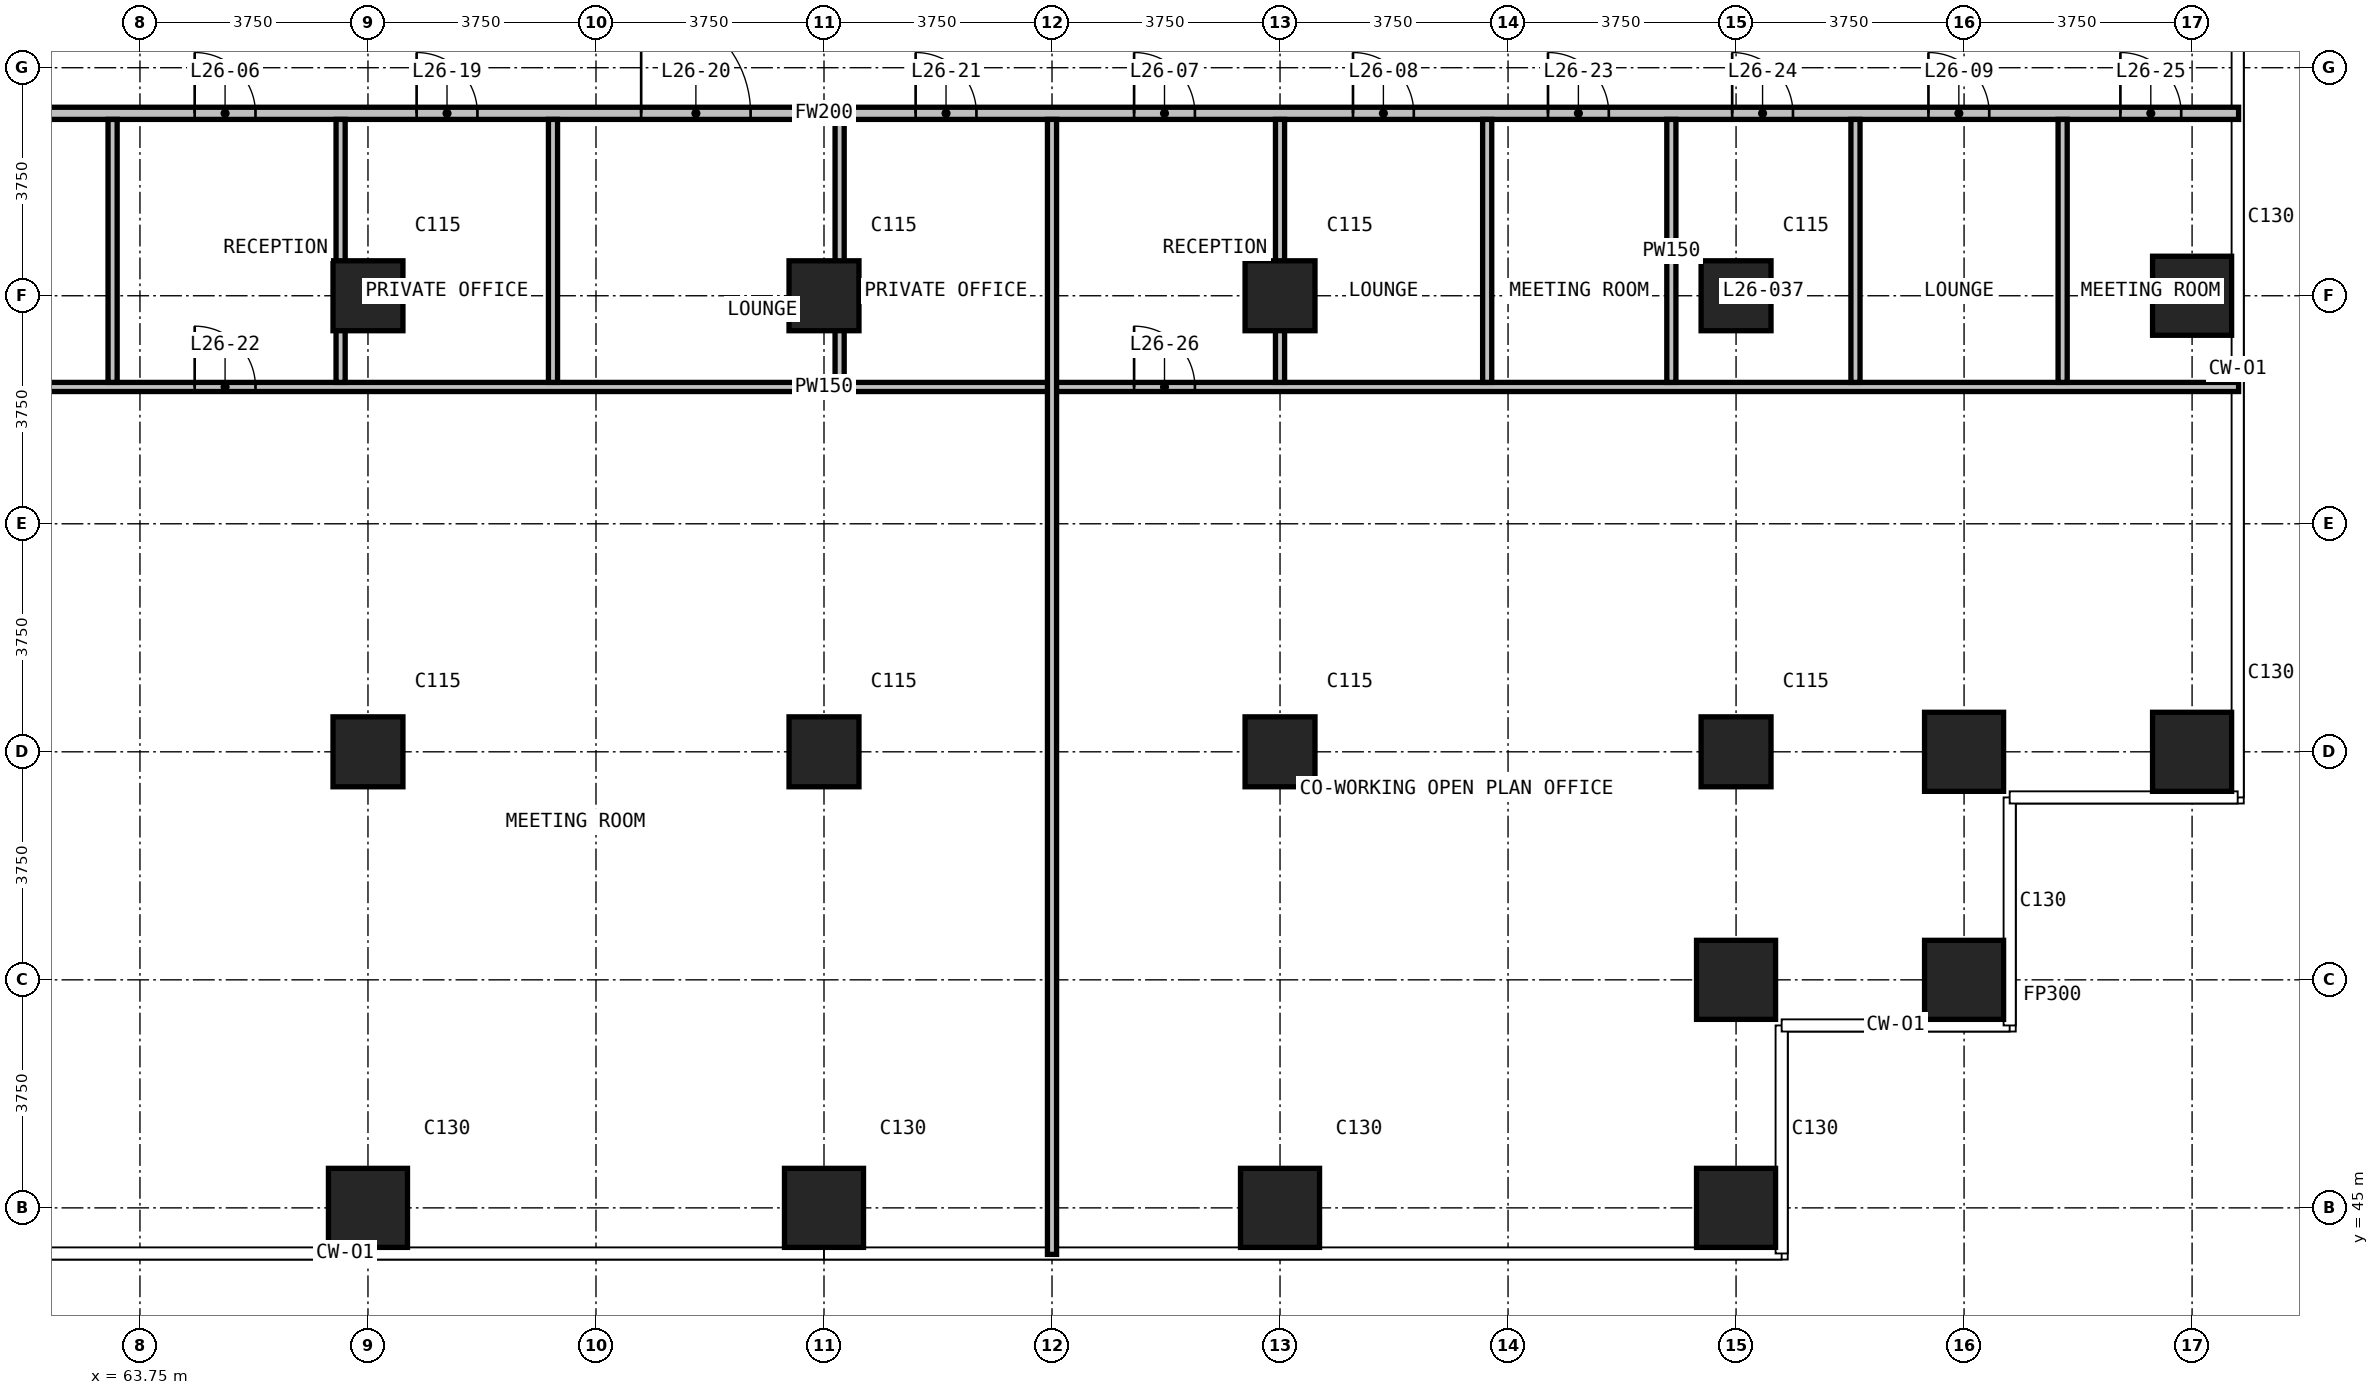
"""IFC4 building model, lengths in metres.
Left out: names, types, materials, properties, quantities, classifications, styles, units other than length and angle.
Written with IfcOpenShell. Run it as: python <this file> out.ifc"""

import sys

from ifc_helpers import new_model, si_unit, direction, frame, frame_2d, origin, origin_2d, place, context, subcontext, project, spatial, rectangle, extrude, element, fill, save


model = new_model("IFC4")
c1 = context("Model", 3, precision=1e-05, world=origin(), true_north=direction((0.0, 1.0)))
c2 = subcontext(c1, "Body", "Model", "MODEL_VIEW")
j1 = project(units=[si_unit("LENGTHUNIT", "METRE"), si_unit("PLANEANGLEUNIT", "RADIAN")], contexts=[c1])
p1 = place(None, origin())
s1 = spatial("IfcSite", under=j1, at=p1, CompositionType="ELEMENT")
p2 = place(p1, origin())
s2 = spatial("IfcBuilding", under=s1, at=p2, CompositionType="ELEMENT")
p3 = place(p2, frame((0.0, 0.0, 107.2)))
s3 = spatial("IfcBuildingStorey", under=s2, at=p3, CompositionType="ELEMENT", Elevation=107.2)
p4 = place(p3, frame((67.5, 45.0, 0.0), z_axis=(0.0, 0.0, 1.0), x_axis=(1.0, 0.0, 0.0)))
e1 = element("IfcColumn", 1, at=p4, inside=s3, PredefinedType="COLUMN", context=c2, shape_type="SweptSolid", body=[
    extrude(rectangle(XDim=1.3, YDim=1.3, at=origin_2d()), origin(), (0.0, 0.0, 1.0), 3.6),
])
for number, where, z_axis, x_axis in (
    (2, (67.5, 52.5, 0.0), (0.0, 0.0, 1.0), (1.0, 0.0, 0.0)),
    (3, (67.5, 60.0, 0.0), (0.0, 0.0, 1.0), (1.0, 0.0, 0.0)),
):
    element("IfcColumn", number, at=place(p3, frame(where, z_axis=z_axis, x_axis=x_axis)), inside=s3, PredefinedType="COLUMN", context=c2, shape_type="SweptSolid", body=[
        extrude(rectangle(XDim=1.15, YDim=1.15, at=origin_2d()), origin(), (0.0, 0.0, 1.0), 3.6),
    ])
p5 = place(p3, frame((75.0, 45.0, 0.0), z_axis=(0.0, 0.0, 1.0), x_axis=(1.0, 0.0, 0.0)))
e4 = element("IfcColumn", 4, at=p5, inside=s3, PredefinedType="COLUMN", context=c2, shape_type="SweptSolid", body=[
    extrude(rectangle(XDim=1.3, YDim=1.3, at=origin_2d()), origin(), (0.0, 0.0, 1.0), 3.6),
])
for number, where, z_axis, x_axis in (
    (5, (75.0, 52.5, 0.0), (0.0, 0.0, 1.0), (1.0, 0.0, 0.0)),
    (6, (75.0, 60.0, 0.0), (0.0, 0.0, 1.0), (1.0, 0.0, 0.0)),
):
    element("IfcColumn", number, at=place(p3, frame(where, z_axis=z_axis, x_axis=x_axis)), inside=s3, PredefinedType="COLUMN", context=c2, shape_type="SweptSolid", body=[
        extrude(rectangle(XDim=1.15, YDim=1.15, at=origin_2d()), origin(), (0.0, 0.0, 1.0), 3.6),
    ])
p6 = place(p3, frame((82.5, 45.0, 0.0), z_axis=(0.0, 0.0, 1.0), x_axis=(1.0, 0.0, 0.0)))
e7 = element("IfcColumn", 7, at=p6, inside=s3, PredefinedType="COLUMN", context=c2, shape_type="SweptSolid", body=[
    extrude(rectangle(XDim=1.3, YDim=1.3, at=origin_2d()), origin(), (0.0, 0.0, 1.0), 3.6),
])
for number, where, z_axis, x_axis in (
    (8, (82.5, 52.5, 0.0), (0.0, 0.0, 1.0), (1.0, 0.0, 0.0)),
    (9, (82.5, 60.0, 0.0), (0.0, 0.0, 1.0), (1.0, 0.0, 0.0)),
):
    element("IfcColumn", number, at=place(p3, frame(where, z_axis=z_axis, x_axis=x_axis)), inside=s3, PredefinedType="COLUMN", context=c2, shape_type="SweptSolid", body=[
        extrude(rectangle(XDim=1.15, YDim=1.15, at=origin_2d()), origin(), (0.0, 0.0, 1.0), 3.6),
    ])
for number, where, z_axis, x_axis in (
    (10, (90.0, 45.0, 0.0), (0.0, 0.0, 1.0), (1.0, 0.0, 0.0)),
    (11, (90.0, 48.75, 0.0), (0.0, 0.0, 1.0), (1.0, 0.0, 0.0)),
):
    element("IfcColumn", number, at=place(p3, frame(where, z_axis=z_axis, x_axis=x_axis)), inside=s3, PredefinedType="COLUMN", context=c2, shape_type="SweptSolid", body=[
        extrude(rectangle(XDim=1.3, YDim=1.3, at=origin_2d()), origin(), (0.0, 0.0, 1.0), 3.6),
    ])
for number, where, z_axis, x_axis in (
    (12, (90.0, 52.5, 0.0), (0.0, 0.0, 1.0), (1.0, 0.0, 0.0)),
    (13, (90.0, 60.0, 0.0), (0.0, 0.0, 1.0), (1.0, 0.0, 0.0)),
):
    element("IfcColumn", number, at=place(p3, frame(where, z_axis=z_axis, x_axis=x_axis)), inside=s3, PredefinedType="COLUMN", context=c2, shape_type="SweptSolid", body=[
        extrude(rectangle(XDim=1.15, YDim=1.15, at=origin_2d()), origin(), (0.0, 0.0, 1.0), 3.6),
    ])
for number, where, z_axis, x_axis in (
    (14, (93.75, 48.75, 0.0), (0.0, 0.0, 1.0), (1.0, 0.0, 0.0)),
    (15, (93.75, 52.5, 0.0), (0.0, 0.0, 1.0), (1.0, 0.0, 0.0)),
    (16, (97.5, 52.5, 0.0), (0.0, 0.0, 1.0), (1.0, 0.0, 0.0)),
    (17, (97.5, 60.0, 0.0), (0.0, 0.0, 1.0), (1.0, 0.0, 0.0)),
):
    element("IfcColumn", number, at=place(p3, frame(where, z_axis=z_axis, x_axis=x_axis)), inside=s3, PredefinedType="COLUMN", context=c2, shape_type="SweptSolid", body=[
        extrude(rectangle(XDim=1.3, YDim=1.3, at=origin_2d()), origin(), (0.0, 0.0, 1.0), 3.6),
    ])
p7 = place(p3, frame((51.735, 63.0, 0.0), z_axis=(0.0, 0.0, 1.0), x_axis=(1.0, 0.0, 0.0)))
e18 = element("IfcWall", 18, at=p7, inside=s3, PredefinedType="PARTITIONING", context=c2, shape_type="SweptSolid", body=[
    extrude(rectangle(XDim=46.53, YDim=0.2, at=frame_2d((23.265, 0.0))), origin(), (0.0, 0.0, 1.0), 3.3),
])
p8 = place(p7, frame((12.915, 0.0, 0.0)))
e19 = element("IfcOpeningElement", 19, at=p8, cuts=e18, PredefinedType="OPENING", context=c2, shape_type="SweptSolid", body=[
    extrude(rectangle(XDim=1.0, YDim=2.2, at=frame_2d((0.5, 1.1))), frame((0.0, 0.11, 0.0), z_axis=(0.0, -1.0, 0.0), x_axis=(1.0, 0.0, 0.0)), (0.0, 0.0, 1.0), 0.22),
])
p9 = place(p7, frame((28.365, 0.0, 0.0)))
e20 = element("IfcOpeningElement", 20, at=p9, cuts=e18, PredefinedType="OPENING", context=c2, shape_type="SweptSolid", body=[
    extrude(rectangle(XDim=1.0, YDim=2.2, at=frame_2d((0.5, 1.1))), frame((0.0, 0.11, 0.0), z_axis=(0.0, -1.0, 0.0), x_axis=(1.0, 0.0, 0.0)), (0.0, 0.0, 1.0), 0.22),
])
p10 = place(p7, frame((31.965, 0.0, 0.0)))
e21 = element("IfcOpeningElement", 21, at=p10, cuts=e18, PredefinedType="OPENING", context=c2, shape_type="SweptSolid", body=[
    extrude(rectangle(XDim=1.0, YDim=2.2, at=frame_2d((0.5, 1.1))), frame((0.0, 0.11, 0.0), z_axis=(0.0, -1.0, 0.0), x_axis=(1.0, 0.0, 0.0)), (0.0, 0.0, 1.0), 0.22),
])
p11 = place(p7, frame((41.429, 0.0, 0.0)))
e22 = element("IfcOpeningElement", 22, at=p11, cuts=e18, PredefinedType="OPENING", context=c2, shape_type="SweptSolid", body=[
    extrude(rectangle(XDim=1.0, YDim=2.2, at=frame_2d((0.5, 1.1))), frame((0.0, 0.11, 0.0), z_axis=(0.0, -1.0, 0.0), x_axis=(1.0, 0.0, 0.0)), (0.0, 0.0, 1.0), 0.22),
])
p12 = place(p7, frame((1.15, 0.0, 0.0)))
e23 = element("IfcOpeningElement", 23, at=p12, cuts=e18, PredefinedType="OPENING", context=c2, shape_type="SweptSolid", body=[
    extrude(rectangle(XDim=1.8, YDim=2.2, at=frame_2d((0.9, 1.1))), frame((0.0, 0.11, 0.0), z_axis=(0.0, -1.0, 0.0), x_axis=(1.0, 0.0, 0.0)), (0.0, 0.0, 1.0), 0.22),
])
p13 = place(p7, frame((5.234, 0.0, 0.0)))
e24 = element("IfcOpeningElement", 24, at=p13, cuts=e18, PredefinedType="OPENING", context=c2, shape_type="SweptSolid", body=[
    extrude(rectangle(XDim=1.0, YDim=2.2, at=frame_2d((0.5, 1.1))), frame((0.0, 0.11, 0.0), z_axis=(0.0, -1.0, 0.0), x_axis=(1.0, 0.0, 0.0)), (0.0, 0.0, 1.0), 0.22),
])
p14 = place(p7, frame((8.546, 0.0, 0.0)))
e25 = element("IfcOpeningElement", 25, at=p14, cuts=e18, PredefinedType="OPENING", context=c2, shape_type="SweptSolid", body=[
    extrude(rectangle(XDim=1.8, YDim=2.2, at=frame_2d((0.9, 1.1))), frame((0.0, 0.11, 0.0), z_axis=(0.0, -1.0, 0.0), x_axis=(1.0, 0.0, 0.0)), (0.0, 0.0, 1.0), 0.22),
])
p15 = place(p7, frame((16.565, 0.0, 0.0)))
e26 = element("IfcOpeningElement", 26, at=p15, cuts=e18, PredefinedType="OPENING", context=c2, shape_type="SweptSolid", body=[
    extrude(rectangle(XDim=1.0, YDim=2.2, at=frame_2d((0.5, 1.1))), frame((0.0, 0.11, 0.0), z_axis=(0.0, -1.0, 0.0), x_axis=(1.0, 0.0, 0.0)), (0.0, 0.0, 1.0), 0.22),
])
p16 = place(p7, frame((20.258, 0.0, 0.0)))
e27 = element("IfcOpeningElement", 27, at=p16, cuts=e18, PredefinedType="OPENING", context=c2, shape_type="SweptSolid", body=[
    extrude(rectangle(XDim=1.8, YDim=2.2, at=frame_2d((0.9, 1.1))), frame((0.0, 0.11, 0.0), z_axis=(0.0, -1.0, 0.0), x_axis=(1.0, 0.0, 0.0)), (0.0, 0.0, 1.0), 0.22),
])
p17 = place(p7, frame((24.772, 0.0, 0.0)))
e28 = element("IfcOpeningElement", 28, at=p17, cuts=e18, PredefinedType="OPENING", context=c2, shape_type="SweptSolid", body=[
    extrude(rectangle(XDim=1.0, YDim=2.2, at=frame_2d((0.5, 1.1))), frame((0.0, 0.11, 0.0), z_axis=(0.0, -1.0, 0.0), x_axis=(1.0, 0.0, 0.0)), (0.0, 0.0, 1.0), 0.22),
])
p18 = place(p7, frame((35.172, 0.0, 0.0)))
e29 = element("IfcOpeningElement", 29, at=p18, cuts=e18, PredefinedType="OPENING", context=c2, shape_type="SweptSolid", body=[
    extrude(rectangle(XDim=1.0, YDim=2.2, at=frame_2d((0.5, 1.1))), frame((0.0, 0.11, 0.0), z_axis=(0.0, -1.0, 0.0), x_axis=(1.0, 0.0, 0.0)), (0.0, 0.0, 1.0), 0.22),
])
p19 = place(p7, frame((38.201, 0.0, 0.0)))
e30 = element("IfcOpeningElement", 30, at=p19, cuts=e18, PredefinedType="OPENING", context=c2, shape_type="SweptSolid", body=[
    extrude(rectangle(XDim=1.0, YDim=2.2, at=frame_2d((0.5, 1.1))), frame((0.0, 0.11, 0.0), z_axis=(0.0, -1.0, 0.0), x_axis=(1.0, 0.0, 0.0)), (0.0, 0.0, 1.0), 0.22),
])
p20 = place(p7, frame((44.586, 0.0, 0.0)))
e31 = element("IfcOpeningElement", 31, at=p20, cuts=e18, PredefinedType="OPENING", context=c2, shape_type="SweptSolid", body=[
    extrude(rectangle(XDim=1.0, YDim=2.2, at=frame_2d((0.5, 1.1))), frame((0.0, 0.11, 0.0), z_axis=(0.0, -1.0, 0.0), x_axis=(1.0, 0.0, 0.0)), (0.0, 0.0, 1.0), 0.22),
])
p21 = place(p3, frame((51.735, 58.5, 0.0), z_axis=(0.0, 0.0, 1.0), x_axis=(1.0, 0.0, 0.0)))
e32 = element("IfcWall", 32, at=p21, inside=s3, PredefinedType="PARTITIONING", context=c2, shape_type="SweptSolid", body=[
    extrude(rectangle(XDim=46.53, YDim=0.15, at=frame_2d((23.265, 0.0))), origin(), (0.0, 0.0, 1.0), 3.3),
])
p22 = place(p21, frame((12.915, 0.0, 0.0)))
e33 = element("IfcOpeningElement", 33, at=p22, cuts=e32, PredefinedType="OPENING", context=c2, shape_type="SweptSolid", body=[
    extrude(rectangle(XDim=1.0, YDim=2.2, at=frame_2d((0.5, 1.1))), frame((0.0, 0.085, 0.0), z_axis=(0.0, -1.0, 0.0), x_axis=(1.0, 0.0, 0.0)), (0.0, 0.0, 1.0), 0.17),
])
p23 = place(p21, frame((28.365, 0.0, 0.0)))
e34 = element("IfcOpeningElement", 34, at=p23, cuts=e32, PredefinedType="OPENING", context=c2, shape_type="SweptSolid", body=[
    extrude(rectangle(XDim=1.0, YDim=2.2, at=frame_2d((0.5, 1.1))), frame((0.0, 0.085, 0.0), z_axis=(0.0, -1.0, 0.0), x_axis=(1.0, 0.0, 0.0)), (0.0, 0.0, 1.0), 0.17),
])
for number, where, z_axis, x_axis in (
    (35, (63.3, 58.575, 0.0), (0.0, 0.0, 1.0), (0.0, 1.0, 0.0)),
    (36, (67.05, 58.575, 0.0), (0.0, 0.0, 1.0), (0.0, 1.0, 0.0)),
    (37, (70.543, 58.575, 0.0), (0.0, 0.0, 1.0), (0.0, 1.0, 0.0)),
    (38, (75.257, 58.575, 0.0), (0.0, 0.0, 1.0), (0.0, 1.0, 0.0)),
):
    element("IfcWall", number, at=place(p3, frame(where, z_axis=z_axis, x_axis=x_axis)), inside=s3, PredefinedType="PARTITIONING", context=c2, shape_type="SweptSolid", body=[
        extrude(rectangle(XDim=4.325, YDim=0.15, at=frame_2d((2.163, 0.0))), origin(), (0.0, 0.0, 1.0), 3.3),
    ])
p24 = place(p3, frame((78.75, 44.235, 0.0), z_axis=(0.0, 0.0, 1.0), x_axis=(0.0, 1.0, 0.0)))
e39 = element("IfcWall", 39, at=p24, inside=s3, PredefinedType="PARTITIONING", context=c2, shape_type="SweptSolid", body=[
    extrude(rectangle(XDim=18.665, YDim=0.15, at=frame_2d((9.333, 0.0))), origin(), (0.0, 0.0, 1.0), 3.3),
])
for number, where, z_axis, x_axis in (
    (40, (82.5, 58.575, 0.0), (0.0, 0.0, 1.0), (0.0, 1.0, 0.0)),
    (41, (85.907, 58.575, 0.0), (0.0, 0.0, 1.0), (0.0, 1.0, 0.0)),
    (42, (88.936, 58.575, 0.0), (0.0, 0.0, 1.0), (0.0, 1.0, 0.0)),
    (43, (91.964, 58.575, 0.0), (0.0, 0.0, 1.0), (0.0, 1.0, 0.0)),
    (44, (95.371, 58.575, 0.0), (0.0, 0.0, 1.0), (0.0, 1.0, 0.0)),
):
    element("IfcWall", number, at=place(p3, frame(where, z_axis=z_axis, x_axis=x_axis)), inside=s3, PredefinedType="PARTITIONING", context=c2, shape_type="SweptSolid", body=[
        extrude(rectangle(XDim=4.325, YDim=0.15, at=frame_2d((2.163, 0.0))), origin(), (0.0, 0.0, 1.0), 3.3),
    ])
p25 = place(p8, origin())
e45 = element("IfcDoor", 45, at=p25, inside=s3, OperationType="SINGLE_SWING_LEFT", PredefinedType="DOOR", context=c2, shape_type="SweptSolid", body=[
    extrude(rectangle(XDim=1.0, YDim=2.2, at=frame_2d((0.5, 1.1))), frame((0.0, 0.025, 0.0), z_axis=(0.0, -1.0, 0.0), x_axis=(1.0, 0.0, 0.0)), (0.0, 0.0, 1.0), 0.05),
])
fill(e19, e45)
p26 = place(p9, origin())
e46 = element("IfcDoor", 46, at=p26, inside=s3, OperationType="SINGLE_SWING_LEFT", PredefinedType="DOOR", context=c2, shape_type="SweptSolid", body=[
    extrude(rectangle(XDim=1.0, YDim=2.2, at=frame_2d((0.5, 1.1))), frame((0.0, 0.025, 0.0), z_axis=(0.0, -1.0, 0.0), x_axis=(1.0, 0.0, 0.0)), (0.0, 0.0, 1.0), 0.05),
])
fill(e20, e46)
p27 = place(p10, origin())
e47 = element("IfcDoor", 47, at=p27, inside=s3, OperationType="SINGLE_SWING_RIGHT", PredefinedType="DOOR", context=c2, shape_type="SweptSolid", body=[
    extrude(rectangle(XDim=1.0, YDim=2.2, at=frame_2d((0.5, 1.1))), frame((0.0, 0.025, 0.0), z_axis=(0.0, -1.0, 0.0), x_axis=(1.0, 0.0, 0.0)), (0.0, 0.0, 1.0), 0.05),
])
fill(e21, e47)
p28 = place(p11, origin())
e48 = element("IfcDoor", 48, at=p28, inside=s3, OperationType="SINGLE_SWING_LEFT", PredefinedType="DOOR", context=c2, shape_type="SweptSolid", body=[
    extrude(rectangle(XDim=1.0, YDim=2.2, at=frame_2d((0.5, 1.1))), frame((0.0, 0.025, 0.0), z_axis=(0.0, -1.0, 0.0), x_axis=(1.0, 0.0, 0.0)), (0.0, 0.0, 1.0), 0.05),
])
fill(e22, e48)
p29 = place(p15, origin())
e49 = element("IfcDoor", 49, at=p29, inside=s3, OperationType="SINGLE_SWING_LEFT", PredefinedType="DOOR", context=c2, shape_type="SweptSolid", body=[
    extrude(rectangle(XDim=1.0, YDim=2.2, at=frame_2d((0.5, 1.1))), frame((0.0, 0.025, 0.0), z_axis=(0.0, -1.0, 0.0), x_axis=(1.0, 0.0, 0.0)), (0.0, 0.0, 1.0), 0.05),
])
fill(e26, e49)
p30 = place(p16, origin())
e50 = element("IfcDoor", 50, at=p30, inside=s3, OperationType="DOUBLE_DOOR_SINGLE_SWING", PredefinedType="DOOR", context=c2, shape_type="SweptSolid", body=[
    extrude(rectangle(XDim=1.8, YDim=2.2, at=frame_2d((0.9, 1.1))), frame((0.0, 0.025, 0.0), z_axis=(0.0, -1.0, 0.0), x_axis=(1.0, 0.0, 0.0)), (0.0, 0.0, 1.0), 0.05),
])
fill(e27, e50)
p31 = place(p17, origin())
e51 = element("IfcDoor", 51, at=p31, inside=s3, OperationType="SINGLE_SWING_LEFT", PredefinedType="DOOR", context=c2, shape_type="SweptSolid", body=[
    extrude(rectangle(XDim=1.0, YDim=2.2, at=frame_2d((0.5, 1.1))), frame((0.0, 0.025, 0.0), z_axis=(0.0, -1.0, 0.0), x_axis=(1.0, 0.0, 0.0)), (0.0, 0.0, 1.0), 0.05),
])
fill(e28, e51)
p32 = place(p22, origin())
e52 = element("IfcDoor", 52, at=p32, inside=s3, OperationType="SINGLE_SWING_LEFT", PredefinedType="DOOR", context=c2, shape_type="SweptSolid", body=[
    extrude(rectangle(XDim=1.0, YDim=2.2, at=frame_2d((0.5, 1.1))), frame((0.0, 0.025, 0.0), z_axis=(0.0, -1.0, 0.0), x_axis=(1.0, 0.0, 0.0)), (0.0, 0.0, 1.0), 0.05),
])
fill(e33, e52)
p33 = place(p18, origin())
e53 = element("IfcDoor", 53, at=p33, inside=s3, OperationType="SINGLE_SWING_RIGHT", PredefinedType="DOOR", context=c2, shape_type="SweptSolid", body=[
    extrude(rectangle(XDim=1.0, YDim=2.2, at=frame_2d((0.5, 1.1))), frame((0.0, 0.025, 0.0), z_axis=(0.0, -1.0, 0.0), x_axis=(1.0, 0.0, 0.0)), (0.0, 0.0, 1.0), 0.05),
])
fill(e29, e53)
p34 = place(p19, origin())
e54 = element("IfcDoor", 54, at=p34, inside=s3, OperationType="SINGLE_SWING_LEFT", PredefinedType="DOOR", context=c2, shape_type="SweptSolid", body=[
    extrude(rectangle(XDim=1.0, YDim=2.2, at=frame_2d((0.5, 1.1))), frame((0.0, 0.025, 0.0), z_axis=(0.0, -1.0, 0.0), x_axis=(1.0, 0.0, 0.0)), (0.0, 0.0, 1.0), 0.05),
])
fill(e30, e54)
p35 = place(p20, origin())
e55 = element("IfcDoor", 55, at=p35, inside=s3, OperationType="SINGLE_SWING_RIGHT", PredefinedType="DOOR", context=c2, shape_type="SweptSolid", body=[
    extrude(rectangle(XDim=1.0, YDim=2.2, at=frame_2d((0.5, 1.1))), frame((0.0, 0.025, 0.0), z_axis=(0.0, -1.0, 0.0), x_axis=(1.0, 0.0, 0.0)), (0.0, 0.0, 1.0), 0.05),
])
fill(e31, e55)
p36 = place(p23, origin())
e56 = element("IfcDoor", 56, at=p36, inside=s3, OperationType="SINGLE_SWING_LEFT", PredefinedType="DOOR", context=c2, shape_type="SweptSolid", body=[
    extrude(rectangle(XDim=1.0, YDim=2.2, at=frame_2d((0.5, 1.1))), frame((0.0, 0.025, 0.0), z_axis=(0.0, -1.0, 0.0), x_axis=(1.0, 0.0, 0.0)), (0.0, 0.0, 1.0), 0.05),
])
fill(e34, e56)
save(model, sys.argv[1])
